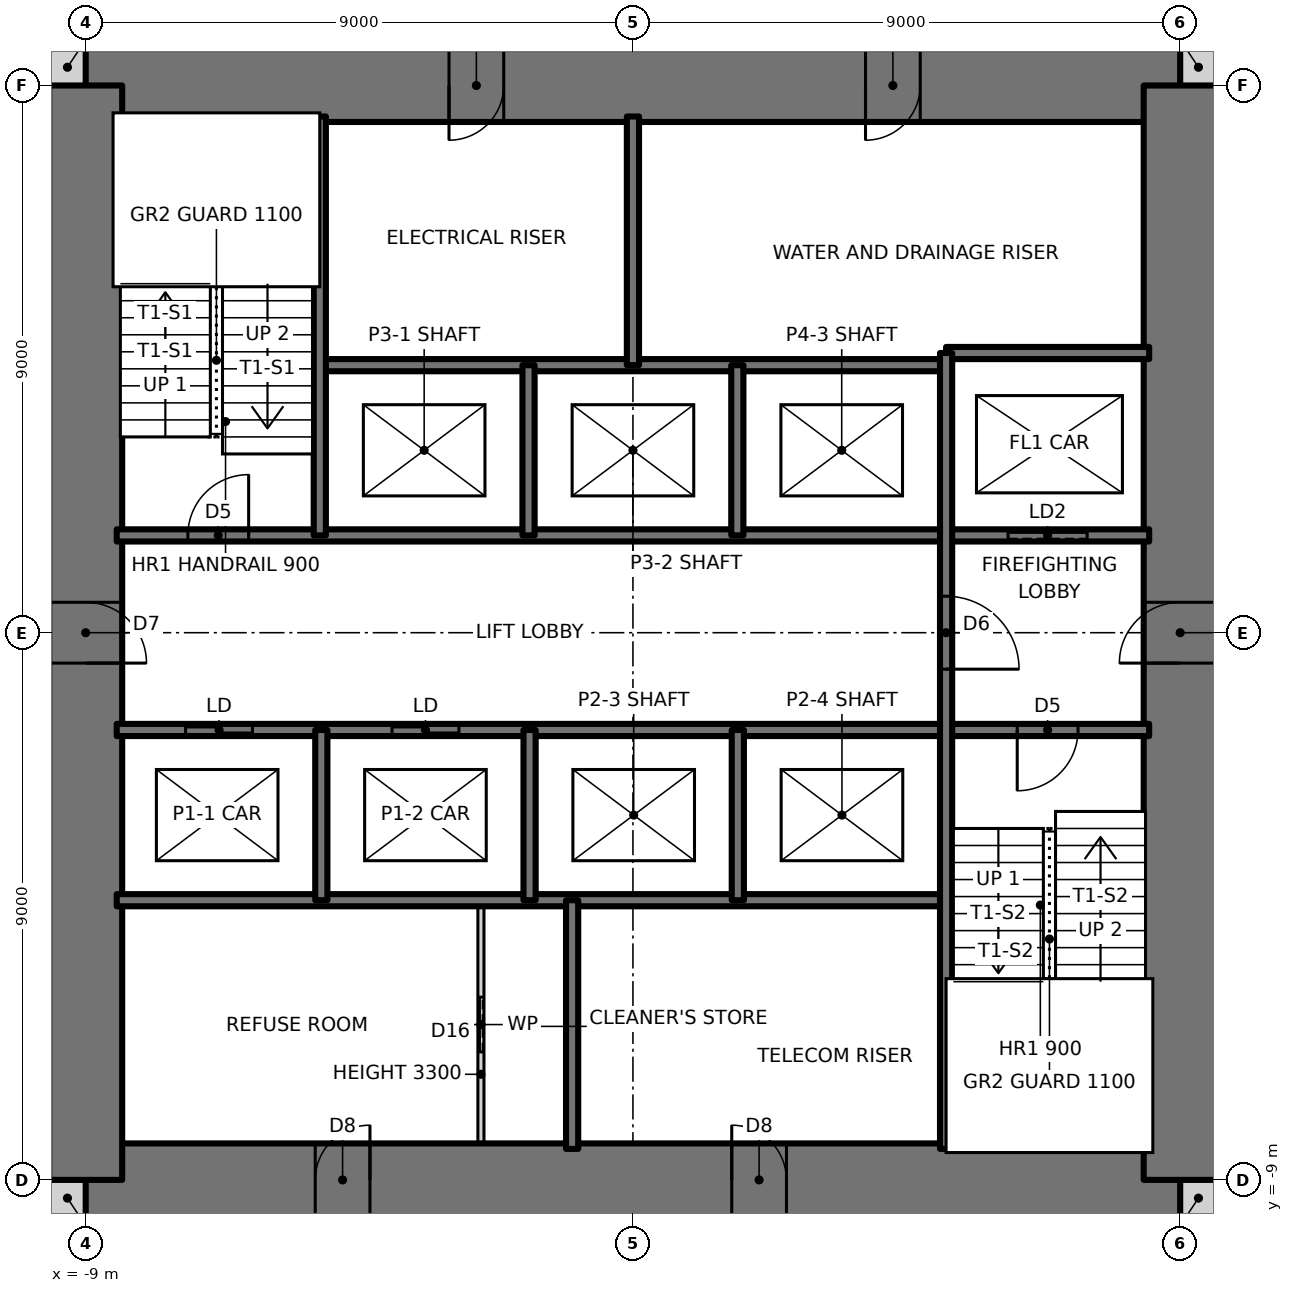
"""IFC4 building model, lengths in metres.
Left out: names, types, materials, properties, quantities, classifications, styles, units other than length and angle.
Written with IfcOpenShell. Run it as: python <this file> out.ifc"""

import sys

from ifc_helpers import new_model, si_unit, direction, frame, frame_2d, origin, place, context, subcontext, project, spatial, rectangle, extrude, element, fill, save


model = new_model("IFC4")
c1 = context("Model", 3, precision=1e-05, world=origin(), true_north=direction((0.0, 1.0)))
c2 = subcontext(c1, "Body", "Model", "MODEL_VIEW")
j1 = project(units=[si_unit("LENGTHUNIT", "METRE"), si_unit("PLANEANGLEUNIT", "RADIAN")], contexts=[c1])
p1 = place(None, origin())
s1 = spatial("IfcSite", under=j1, at=p1, CompositionType="ELEMENT")
p2 = place(p1, origin())
s2 = spatial("IfcBuilding", under=s1, at=p2, CompositionType="ELEMENT")
p3 = place(p2, frame((0.0, 0.0, 18.5)))
s3 = spatial("IfcBuildingStorey", under=s2, at=p3, CompositionType="ELEMENT", Elevation=18.5)
for number, where, z_axis, x_axis in (
    (1, (-9.6, -9.3, 0.0), (0.0, 0.0, 1.0), (1.0, 0.0, 0.0)),
    (2, (9.0, -9.3, 0.0), (0.0, 0.0, 1.0), (1.0, 0.0, 0.0)),
    (3, (9.0, 9.3, 0.0), (0.0, 0.0, 1.0), (1.0, 0.0, 0.0)),
    (4, (-9.6, 9.3, 0.0), (0.0, 0.0, 1.0), (1.0, 0.0, 0.0)),
):
    element("IfcWall", number, at=place(p3, frame(where, z_axis=z_axis, x_axis=x_axis)), inside=s3, PredefinedType="SOLIDWALL", context=c2, shape_type="SweptSolid", body=[
        extrude(rectangle(XDim=0.6, YDim=0.6, at=frame_2d((0.3, 0.0))), origin(), (0.0, 0.0, 1.0), 3.5),
    ])
p4 = place(p3, frame((-9.0, -9.0, 0.0), z_axis=(0.0, 0.0, 1.0), x_axis=(1.0, 0.0, 0.0)))
e5 = element("IfcWall", 5, at=p4, inside=s3, PredefinedType="SHEAR", context=c2, shape_type="SweptSolid", body=[
    extrude(rectangle(XDim=18.0, YDim=1.2, at=frame_2d((9.0, 0.0))), origin(), (0.0, 0.0, 1.0), 3.5),
])
p5 = place(p4, frame((3.775, 0.0, 0.0)))
e6 = element("IfcOpeningElement", 6, at=p5, cuts=e5, PredefinedType="OPENING", context=c2, shape_type="SweptSolid", body=[
    extrude(rectangle(XDim=0.9, YDim=2.1, at=frame_2d((0.45, 1.05))), frame((0.0, 0.61, 0.0), z_axis=(0.0, -1.0, 0.0), x_axis=(1.0, 0.0, 0.0)), (0.0, 0.0, 1.0), 1.22),
])
p6 = place(p4, frame((10.625, 0.0, 0.0)))
e7 = element("IfcOpeningElement", 7, at=p6, cuts=e5, PredefinedType="OPENING", context=c2, shape_type="SweptSolid", body=[
    extrude(rectangle(XDim=0.9, YDim=2.1, at=frame_2d((0.45, 1.05))), frame((0.0, 0.61, 0.0), z_axis=(0.0, -1.0, 0.0), x_axis=(1.0, 0.0, 0.0)), (0.0, 0.0, 1.0), 1.22),
])
p7 = place(p3, frame((9.0, 9.0, 0.0), z_axis=(0.0, 0.0, 1.0), x_axis=(-1.0, 0.0, 0.0)))
e8 = element("IfcWall", 8, at=p7, inside=s3, PredefinedType="SHEAR", context=c2, shape_type="SweptSolid", body=[
    extrude(rectangle(XDim=18.0, YDim=1.2, at=frame_2d((9.0, 0.0))), origin(), (0.0, 0.0, 1.0), 3.5),
])
p8 = place(p7, frame((11.125, 0.0, 0.0)))
e9 = element("IfcOpeningElement", 9, at=p8, cuts=e8, PredefinedType="OPENING", context=c2, shape_type="SweptSolid", body=[
    extrude(rectangle(XDim=0.9, YDim=2.1, at=frame_2d((0.45, 1.05))), frame((0.0, 0.61, 0.0), z_axis=(0.0, -1.0, 0.0), x_axis=(1.0, 0.0, 0.0)), (0.0, 0.0, 1.0), 1.22),
])
p9 = place(p7, frame((4.275, 0.0, 0.0)))
e10 = element("IfcOpeningElement", 10, at=p9, cuts=e8, PredefinedType="OPENING", context=c2, shape_type="SweptSolid", body=[
    extrude(rectangle(XDim=0.9, YDim=2.1, at=frame_2d((0.45, 1.05))), frame((0.0, 0.61, 0.0), z_axis=(0.0, -1.0, 0.0), x_axis=(1.0, 0.0, 0.0)), (0.0, 0.0, 1.0), 1.22),
])
p10 = place(p3, frame((9.0, -9.0, 0.0), z_axis=(0.0, 0.0, 1.0), x_axis=(0.0, 1.0, 0.0)))
e11 = element("IfcWall", 11, at=p10, inside=s3, PredefinedType="SHEAR", context=c2, shape_type="SweptSolid", body=[
    extrude(rectangle(XDim=18.0, YDim=1.2, at=frame_2d((9.0, 0.0))), origin(), (0.0, 0.0, 1.0), 3.5),
])
p11 = place(p10, frame((8.5, 0.0, 0.0)))
e12 = element("IfcOpeningElement", 12, at=p11, cuts=e11, PredefinedType="OPENING", context=c2, shape_type="SweptSolid", body=[
    extrude(rectangle(XDim=1.0, YDim=2.1, at=frame_2d((0.5, 1.05))), frame((0.0, 0.61, 0.0), z_axis=(0.0, -1.0, 0.0), x_axis=(1.0, 0.0, 0.0)), (0.0, 0.0, 1.0), 1.22),
])
p12 = place(p3, frame((-9.0, 9.0, 0.0), z_axis=(0.0, 0.0, 1.0), x_axis=(0.0, -1.0, 0.0)))
e13 = element("IfcWall", 13, at=p12, inside=s3, PredefinedType="SHEAR", context=c2, shape_type="SweptSolid", body=[
    extrude(rectangle(XDim=18.0, YDim=1.2, at=frame_2d((9.0, 0.0))), origin(), (0.0, 0.0, 1.0), 3.5),
])
p13 = place(p12, frame((8.5, 0.0, 0.0)))
e14 = element("IfcOpeningElement", 14, at=p13, cuts=e13, PredefinedType="OPENING", context=c2, shape_type="SweptSolid", body=[
    extrude(rectangle(XDim=1.0, YDim=2.1, at=frame_2d((0.5, 1.05))), frame((0.0, 0.61, 0.0), z_axis=(0.0, -1.0, 0.0), x_axis=(1.0, 0.0, 0.0)), (0.0, 0.0, 1.0), 1.22),
])
p14 = place(p3, frame((-8.49, -4.4, 0.0), z_axis=(0.0, 0.0, 1.0), x_axis=(1.0, 0.0, 0.0)))
e15 = element("IfcWall", 15, at=p14, inside=s3, PredefinedType="SOLIDWALL", context=c2, shape_type="SweptSolid", body=[
    extrude(rectangle(XDim=13.64, YDim=0.2, at=frame_2d((6.82, 0.0))), origin(), (0.0, 0.0, 1.0), 3.5),
])
p15 = place(p3, frame((-8.49, -1.6, 0.0), z_axis=(0.0, 0.0, 1.0), x_axis=(1.0, 0.0, 0.0)))
e16 = element("IfcWall", 16, at=p15, inside=s3, PredefinedType="SOLIDWALL", context=c2, shape_type="SweptSolid", body=[
    extrude(rectangle(XDim=16.98, YDim=0.2, at=frame_2d((8.49, 0.0))), origin(), (0.0, 0.0, 1.0), 3.5),
])
p16 = place(p15, frame((14.81, 0.0, 0.0)))
e17 = element("IfcOpeningElement", 17, at=p16, cuts=e16, PredefinedType="OPENING", context=c2, shape_type="SweptSolid", body=[
    extrude(rectangle(XDim=1.0, YDim=2.1, at=frame_2d((0.5, 1.05))), frame((0.0, 0.11, 0.0), z_axis=(0.0, -1.0, 0.0), x_axis=(1.0, 0.0, 0.0)), (0.0, 0.0, 1.0), 0.22),
])
p17 = place(p15, frame((1.133, 0.0, 0.0)))
e18 = element("IfcOpeningElement", 18, at=p17, cuts=e16, PredefinedType="OPENING", context=c2, shape_type="SweptSolid", body=[
    extrude(rectangle(XDim=1.1, YDim=2.1, at=frame_2d((0.55, 1.05))), frame((0.0, 0.11, 0.0), z_axis=(0.0, -1.0, 0.0), x_axis=(1.0, 0.0, 0.0)), (0.0, 0.0, 1.0), 0.22),
])
p18 = place(p15, frame((4.528, 0.0, 0.0)))
e19 = element("IfcOpeningElement", 19, at=p18, cuts=e16, PredefinedType="OPENING", context=c2, shape_type="SweptSolid", body=[
    extrude(rectangle(XDim=1.1, YDim=2.1, at=frame_2d((0.55, 1.05))), frame((0.0, 0.11, 0.0), z_axis=(0.0, -1.0, 0.0), x_axis=(1.0, 0.0, 0.0)), (0.0, 0.0, 1.0), 0.22),
])
p19 = place(p3, frame((-8.49, 1.6, 0.0), z_axis=(0.0, 0.0, 1.0), x_axis=(1.0, 0.0, 0.0)))
e20 = element("IfcWall", 20, at=p19, inside=s3, PredefinedType="SOLIDWALL", context=c2, shape_type="SweptSolid", body=[
    extrude(rectangle(XDim=16.98, YDim=0.2, at=frame_2d((8.49, 0.0))), origin(), (0.0, 0.0, 1.0), 3.5),
])
p20 = place(p19, frame((1.17, 0.0, 0.0)))
e21 = element("IfcOpeningElement", 21, at=p20, cuts=e20, PredefinedType="OPENING", context=c2, shape_type="SweptSolid", body=[
    extrude(rectangle(XDim=1.0, YDim=2.1, at=frame_2d((0.5, 1.05))), frame((0.0, 0.11, 0.0), z_axis=(0.0, -1.0, 0.0), x_axis=(1.0, 0.0, 0.0)), (0.0, 0.0, 1.0), 0.22),
])
p21 = place(p19, frame((14.66, 0.0, 0.0)))
e22 = element("IfcOpeningElement", 22, at=p21, cuts=e20, PredefinedType="OPENING", context=c2, shape_type="SweptSolid", body=[
    extrude(rectangle(XDim=1.3, YDim=2.1, at=frame_2d((0.65, 1.05))), frame((0.0, 0.11, 0.0), z_axis=(0.0, -1.0, 0.0), x_axis=(1.0, 0.0, 0.0)), (0.0, 0.0, 1.0), 0.22),
])
p22 = place(p3, frame((-5.15, 4.4, 0.0), z_axis=(0.0, 0.0, 1.0), x_axis=(1.0, 0.0, 0.0)))
e23 = element("IfcWall", 23, at=p22, inside=s3, PredefinedType="SOLIDWALL", context=c2, shape_type="SweptSolid", body=[
    extrude(rectangle(XDim=10.3, YDim=0.2, at=frame_2d((5.15, 0.0))), origin(), (0.0, 0.0, 1.0), 3.5),
])
p23 = place(p3, frame((5.15, 4.6, 0.0), z_axis=(0.0, 0.0, 1.0), x_axis=(1.0, 0.0, 0.0)))
e24 = element("IfcWall", 24, at=p23, inside=s3, PredefinedType="SOLIDWALL", context=c2, shape_type="SweptSolid", body=[
    extrude(rectangle(XDim=3.34, YDim=0.2, at=frame_2d((1.67, 0.0))), origin(), (0.0, 0.0, 1.0), 3.5),
])
p24 = place(p3, frame((5.15, -8.49, 0.0), z_axis=(0.0, 0.0, 1.0), x_axis=(0.0, 1.0, 0.0)))
e25 = element("IfcWall", 25, at=p24, inside=s3, PredefinedType="SOLIDWALL", context=c2, shape_type="SweptSolid", body=[
    extrude(rectangle(XDim=13.09, YDim=0.2, at=frame_2d((6.545, 0.0))), origin(), (0.0, 0.0, 1.0), 3.5),
])
p25 = place(p24, frame((7.89, 0.0, 0.0)))
e26 = element("IfcOpeningElement", 26, at=p25, cuts=e25, PredefinedType="OPENING", context=c2, shape_type="SweptSolid", body=[
    extrude(rectangle(XDim=1.2, YDim=2.1, at=frame_2d((0.6, 1.05))), frame((0.0, 0.11, 0.0), z_axis=(0.0, -1.0, 0.0), x_axis=(1.0, 0.0, 0.0)), (0.0, 0.0, 1.0), 0.22),
])
for number, where, z_axis, x_axis in (
    (27, (1.725, -4.4, 0.0), (0.0, 0.0, 1.0), (0.0, 1.0, 0.0)),
    (28, (1.717, 1.6, 0.0), (0.0, 0.0, 1.0), (0.0, 1.0, 0.0)),
):
    element("IfcWall", number, at=place(p3, frame(where, z_axis=z_axis, x_axis=x_axis)), inside=s3, PredefinedType="SOLIDWALL", context=c2, shape_type="SweptSolid", body=[
        extrude(rectangle(XDim=2.8, YDim=0.2, at=frame_2d((1.4, 0.0))), origin(), (0.0, 0.0, 1.0), 3.5),
    ])
for number, where, z_axis, x_axis in (
    (29, (0.0, 4.4, 0.0), (0.0, 0.0, 1.0), (0.0, 1.0, 0.0)),
    (30, (-1.0, -8.49, 0.0), (0.0, 0.0, 1.0), (0.0, 1.0, 0.0)),
):
    element("IfcWall", number, at=place(p3, frame(where, z_axis=z_axis, x_axis=x_axis)), inside=s3, PredefinedType="SOLIDWALL", context=c2, shape_type="SweptSolid", body=[
        extrude(rectangle(XDim=4.09, YDim=0.2, at=frame_2d((2.045, 0.0))), origin(), (0.0, 0.0, 1.0), 3.5),
    ])
for number, where, z_axis, x_axis in (
    (31, (-1.7, -4.4, 0.0), (0.0, 0.0, 1.0), (0.0, 1.0, 0.0)),
    (32, (-1.717, 1.6, 0.0), (0.0, 0.0, 1.0), (0.0, 1.0, 0.0)),
):
    element("IfcWall", number, at=place(p3, frame(where, z_axis=z_axis, x_axis=x_axis)), inside=s3, PredefinedType="SOLIDWALL", context=c2, shape_type="SweptSolid", body=[
        extrude(rectangle(XDim=2.8, YDim=0.2, at=frame_2d((1.4, 0.0))), origin(), (0.0, 0.0, 1.0), 3.5),
    ])
p26 = place(p3, frame((-2.5, -8.49, 0.0), z_axis=(0.0, 0.0, 1.0), x_axis=(0.0, 1.0, 0.0)))
e33 = element("IfcWall", 33, at=p26, inside=s3, PredefinedType="PARTITIONING", context=c2, shape_type="SweptSolid", body=[
    extrude(rectangle(XDim=4.09, YDim=0.1, at=frame_2d((2.045, 0.0))), origin(), (0.0, 0.0, 1.0), 3.3),
])
p27 = place(p26, frame((1.595, 0.0, 0.0)))
e34 = element("IfcOpeningElement", 34, at=p27, cuts=e33, PredefinedType="OPENING", context=c2, shape_type="SweptSolid", body=[
    extrude(rectangle(XDim=0.9, YDim=2.1, at=frame_2d((0.45, 1.05))), frame((0.0, 0.06, 0.0), z_axis=(0.0, -1.0, 0.0), x_axis=(1.0, 0.0, 0.0)), (0.0, 0.0, 1.0), 0.12),
])
p28 = place(p3, frame((-5.125, -4.4, 0.0), z_axis=(0.0, 0.0, 1.0), x_axis=(0.0, 1.0, 0.0)))
e35 = element("IfcWall", 35, at=p28, inside=s3, PredefinedType="SOLIDWALL", context=c2, shape_type="SweptSolid", body=[
    extrude(rectangle(XDim=2.8, YDim=0.2, at=frame_2d((1.4, 0.0))), origin(), (0.0, 0.0, 1.0), 3.5),
])
p29 = place(p3, frame((-5.15, 1.6, 0.0), z_axis=(0.0, 0.0, 1.0), x_axis=(0.0, 1.0, 0.0)))
e36 = element("IfcWall", 36, at=p29, inside=s3, PredefinedType="SOLIDWALL", context=c2, shape_type="SweptSolid", body=[
    extrude(rectangle(XDim=6.89, YDim=0.2, at=frame_2d((3.445, 0.0))), origin(), (0.0, 0.0, 1.0), 3.5),
])
p30 = place(p20, origin())
e37 = element("IfcDoor", 37, at=p30, inside=s3, OperationType="SINGLE_SWING_RIGHT", PredefinedType="DOOR", context=c2, shape_type="SweptSolid", body=[
    extrude(rectangle(XDim=1.0, YDim=2.1, at=frame_2d((0.5, 1.05))), frame((0.0, 0.025, 0.0), z_axis=(0.0, -1.0, 0.0), x_axis=(1.0, 0.0, 0.0)), (0.0, 0.0, 1.0), 0.05),
])
fill(e21, e37)
p31 = place(p16, frame((1.0, 0.0, 0.0), z_axis=(0.0, 0.0, 1.0), x_axis=(-1.0, 0.0, 0.0)))
e38 = element("IfcDoor", 38, at=p31, inside=s3, OperationType="SINGLE_SWING_RIGHT", PredefinedType="DOOR", context=c2, shape_type="SweptSolid", body=[
    extrude(rectangle(XDim=1.0, YDim=2.1, at=frame_2d((0.5, 1.05))), frame((0.0, 0.025, 0.0), z_axis=(0.0, -1.0, 0.0), x_axis=(1.0, 0.0, 0.0)), (0.0, 0.0, 1.0), 0.05),
])
fill(e17, e38)
p32 = place(p25, frame((1.2, 0.0, 0.0), z_axis=(0.0, 0.0, 1.0), x_axis=(-1.0, 0.0, 0.0)))
e39 = element("IfcDoor", 39, at=p32, inside=s3, OperationType="SINGLE_SWING_RIGHT", PredefinedType="DOOR", context=c2, shape_type="SweptSolid", body=[
    extrude(rectangle(XDim=1.2, YDim=2.1, at=frame_2d((0.6, 1.05))), frame((0.0, 0.025, 0.0), z_axis=(0.0, -1.0, 0.0), x_axis=(1.0, 0.0, 0.0)), (0.0, 0.0, 1.0), 0.05),
])
fill(e26, e39)
p33 = place(p27, origin())
e40 = element("IfcDoor", 40, at=p33, inside=s3, OperationType="SLIDING_TO_LEFT", PredefinedType="DOOR", context=c2, shape_type="SweptSolid", body=[
    extrude(rectangle(XDim=0.9, YDim=2.1, at=frame_2d((0.45, 1.05))), frame((0.0, 0.025, 0.0), z_axis=(0.0, -1.0, 0.0), x_axis=(1.0, 0.0, 0.0)), (0.0, 0.0, 1.0), 0.05),
])
fill(e34, e40)
p34 = place(p13, origin())
e41 = element("IfcDoor", 41, at=p34, inside=s3, OperationType="SINGLE_SWING_RIGHT", PredefinedType="DOOR", context=c2, shape_type="SweptSolid", body=[
    extrude(rectangle(XDim=1.0, YDim=2.1, at=frame_2d((0.5, 1.05))), frame((0.0, 0.025, 0.0), z_axis=(0.0, -1.0, 0.0), x_axis=(1.0, 0.0, 0.0)), (0.0, 0.0, 1.0), 0.05),
])
fill(e14, e41)
p35 = place(p11, origin())
e42 = element("IfcDoor", 42, at=p35, inside=s3, OperationType="SINGLE_SWING_LEFT", PredefinedType="DOOR", context=c2, shape_type="SweptSolid", body=[
    extrude(rectangle(XDim=1.0, YDim=2.1, at=frame_2d((0.5, 1.05))), frame((0.0, 0.025, 0.0), z_axis=(0.0, -1.0, 0.0), x_axis=(1.0, 0.0, 0.0)), (0.0, 0.0, 1.0), 0.05),
])
fill(e12, e42)
p36 = place(p8, origin())
e43 = element("IfcDoor", 43, at=p36, inside=s3, OperationType="SINGLE_SWING_RIGHT", PredefinedType="DOOR", context=c2, shape_type="SweptSolid", body=[
    extrude(rectangle(XDim=0.9, YDim=2.1, at=frame_2d((0.45, 1.05))), frame((0.0, 0.025, 0.0), z_axis=(0.0, -1.0, 0.0), x_axis=(1.0, 0.0, 0.0)), (0.0, 0.0, 1.0), 0.05),
])
fill(e9, e43)
p37 = place(p9, origin())
e44 = element("IfcDoor", 44, at=p37, inside=s3, OperationType="SINGLE_SWING_RIGHT", PredefinedType="DOOR", context=c2, shape_type="SweptSolid", body=[
    extrude(rectangle(XDim=0.9, YDim=2.1, at=frame_2d((0.45, 1.05))), frame((0.0, 0.025, 0.0), z_axis=(0.0, -1.0, 0.0), x_axis=(1.0, 0.0, 0.0)), (0.0, 0.0, 1.0), 0.05),
])
fill(e10, e44)
p38 = place(p5, origin())
e45 = element("IfcDoor", 45, at=p38, inside=s3, OperationType="SINGLE_SWING_RIGHT", PredefinedType="DOOR", context=c2, shape_type="SweptSolid", body=[
    extrude(rectangle(XDim=0.9, YDim=2.1, at=frame_2d((0.45, 1.05))), frame((0.0, 0.025, 0.0), z_axis=(0.0, -1.0, 0.0), x_axis=(1.0, 0.0, 0.0)), (0.0, 0.0, 1.0), 0.05),
])
fill(e6, e45)
p39 = place(p6, origin())
e46 = element("IfcDoor", 46, at=p39, inside=s3, OperationType="SINGLE_SWING_LEFT", PredefinedType="DOOR", context=c2, shape_type="SweptSolid", body=[
    extrude(rectangle(XDim=0.9, YDim=2.1, at=frame_2d((0.45, 1.05))), frame((0.0, 0.025, 0.0), z_axis=(0.0, -1.0, 0.0), x_axis=(1.0, 0.0, 0.0)), (0.0, 0.0, 1.0), 0.05),
])
fill(e7, e46)
p40 = place(p17, origin())
e47 = element("IfcDoor", 47, at=p40, inside=s3, OperationType="DOUBLE_DOOR_SLIDING", PredefinedType="DOOR", context=c2, shape_type="SweptSolid", body=[
    extrude(rectangle(XDim=1.1, YDim=2.1, at=frame_2d((0.55, 1.05))), frame((0.0, 0.025, 0.0), z_axis=(0.0, -1.0, 0.0), x_axis=(1.0, 0.0, 0.0)), (0.0, 0.0, 1.0), 0.05),
])
fill(e18, e47)
p41 = place(p18, origin())
e48 = element("IfcDoor", 48, at=p41, inside=s3, OperationType="DOUBLE_DOOR_SLIDING", PredefinedType="DOOR", context=c2, shape_type="SweptSolid", body=[
    extrude(rectangle(XDim=1.1, YDim=2.1, at=frame_2d((0.55, 1.05))), frame((0.0, 0.025, 0.0), z_axis=(0.0, -1.0, 0.0), x_axis=(1.0, 0.0, 0.0)), (0.0, 0.0, 1.0), 0.05),
])
fill(e19, e48)
p42 = place(p21, origin())
e49 = element("IfcDoor", 49, at=p42, inside=s3, OperationType="SLIDING_TO_LEFT", PredefinedType="DOOR", context=c2, shape_type="SweptSolid", body=[
    extrude(rectangle(XDim=1.3, YDim=2.1, at=frame_2d((0.65, 1.05))), frame((0.0, 0.025, 0.0), z_axis=(0.0, -1.0, 0.0), x_axis=(1.0, 0.0, 0.0)), (0.0, 0.0, 1.0), 0.05),
])
fill(e22, e49)
save(model, sys.argv[1])
